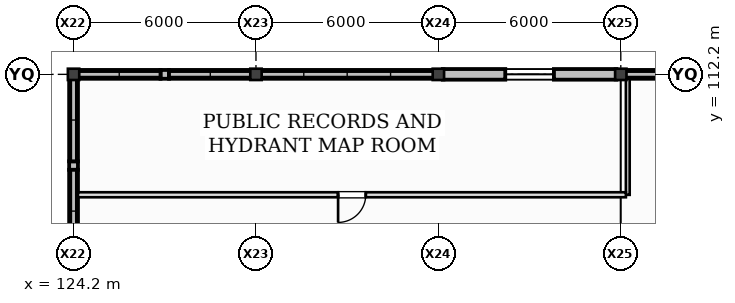
"""IFC4 building model, lengths in metres.
Left out: names, types, materials, properties, quantities, classifications, styles, units other than length and angle.
Written with IfcOpenShell. Run it as: python <this file> out.ifc"""

import sys

from ifc_helpers import new_model, si_unit, direction, frame, frame_2d, origin, origin_2d, place, context, subcontext, project, spatial, rectangle, i_section, extrude, element, fill, save


model = new_model("IFC4")
c1 = context("Model", 3, precision=1e-05, world=origin(), true_north=direction((0.0, 1.0)))
c2 = subcontext(c1, "Body", "Model", "MODEL_VIEW")
j1 = project(units=[si_unit("LENGTHUNIT", "METRE"), si_unit("PLANEANGLEUNIT", "RADIAN")], contexts=[c1])
p1 = place(None, origin())
s1 = spatial("IfcSite", under=j1, at=p1, CompositionType="ELEMENT")
p2 = place(p1, origin())
s2 = spatial("IfcBuilding", under=s1, at=p2, CompositionType="ELEMENT")
p3 = place(p2, origin())
s3 = spatial("IfcBuildingStorey", under=s2, at=p3, CompositionType="ELEMENT", Elevation=0.0)
for number, where, z_axis, x_axis in (
    (1, (124.2, 112.2, 0.0), (0.0, 0.0, 1.0), (1.0, 0.0, 0.0)),
    (2, (130.2, 112.2, 0.0), (0.0, 0.0, 1.0), (1.0, 0.0, 0.0)),
    (3, (136.2, 112.2, 0.0), (0.0, 0.0, 1.0), (1.0, 0.0, 0.0)),
    (4, (142.2, 112.2, 0.0), (0.0, 0.0, 1.0), (1.0, 0.0, 0.0)),
):
    element("IfcColumn", number, at=place(p3, frame(where, z_axis=z_axis, x_axis=x_axis)), inside=s3, PredefinedType="COLUMN", context=c2, shape_type="SweptSolid", body=[
        extrude(i_section(OverallWidth=0.374, OverallDepth=0.372, WebThickness=0.016, FlangeThickness=0.026, at=origin_2d()), origin(), (0.0, 0.0, 1.0), 6.0),
    ])
p4 = place(p3, frame((127.34, 112.2, 0.0), z_axis=(0.0, 0.0, 1.0), x_axis=(-1.0, 0.0, 0.0)))
e5 = element("IfcWall", 5, at=p4, inside=s3, PredefinedType="STANDARD", context=c2, shape_type="SweptSolid", body=[
    extrude(rectangle(XDim=0.28, YDim=0.29, at=frame_2d((0.14, 0.0))), origin(), (0.0, 0.0, 1.0), 5.113),
])
p5 = place(p3, frame((130.055, 112.2, 0.0), z_axis=(0.0, 0.0, 1.0), x_axis=(-1.0, 0.0, 0.0)))
e6 = element("IfcWall", 6, at=p5, inside=s3, PredefinedType="STANDARD", context=c2, shape_type="SweptSolid", body=[
    extrude(rectangle(XDim=2.715, YDim=0.29, at=frame_2d((1.357, 0.0))), origin(), (0.0, 0.0, 1.0), 0.92),
])
p6 = place(p3, frame((127.06, 112.2, 0.0), z_axis=(0.0, 0.0, 1.0), x_axis=(-1.0, 0.0, 0.0)))
e7 = element("IfcWall", 7, at=p6, inside=s3, PredefinedType="STANDARD", context=c2, shape_type="SweptSolid", body=[
    extrude(rectangle(XDim=2.715, YDim=0.29, at=frame_2d((1.357, 0.0))), origin(), (0.0, 0.0, 1.0), 0.32),
])
p7 = place(p3, frame((136.055, 112.2, 0.0), z_axis=(0.0, 0.0, 1.0), x_axis=(-1.0, 0.0, 0.0)))
e8 = element("IfcWall", 8, at=p7, inside=s3, PredefinedType="STANDARD", context=c2, shape_type="SweptSolid", body=[
    extrude(rectangle(XDim=5.71, YDim=0.29, at=frame_2d((2.855, 0.0))), origin(), (0.0, 0.0, 1.0), 0.44),
])
p8 = place(p3, frame((142.055, 112.2, 0.0), z_axis=(0.0, 0.0, 1.0), x_axis=(-1.0, 0.0, 0.0)))
e9 = element("IfcWall", 9, at=p8, inside=s3, PredefinedType="STANDARD", context=c2, shape_type="SweptSolid", body=[
    extrude(rectangle(XDim=5.71, YDim=0.35, at=frame_2d((2.855, 0.0))), origin(), (0.0, 0.0, 1.0), 5.113),
])
p9 = place(p8, frame((2.055, 0.0, 1.0)))
e10 = element("IfcOpeningElement", 10, at=p9, cuts=e9, PredefinedType="OPENING", context=c2, shape_type="SweptSolid", body=[
    extrude(rectangle(XDim=1.6, YDim=1.36, at=frame_2d((0.8, 0.68))), frame((0.0, 0.185, 0.0), z_axis=(0.0, -1.0, 0.0), x_axis=(1.0, 0.0, 0.0)), (0.0, 0.0, 1.0), 0.37),
])
p10 = place(p3, frame((148.055, 112.2, 0.0), z_axis=(0.0, 0.0, 1.0), x_axis=(-1.0, 0.0, 0.0)))
e11 = element("IfcWall", 11, at=p10, inside=s3, PredefinedType="STANDARD", context=c2, shape_type="SweptSolid", body=[
    extrude(rectangle(XDim=5.71, YDim=0.29, at=frame_2d((2.855, 0.0))), origin(), (0.0, 0.0, 1.0), 0.56),
])
p11 = place(p3, frame((124.2, 109.34, 0.0), z_axis=(0.0, 0.0, 1.0), x_axis=(0.0, -1.0, 0.0)))
e12 = element("IfcWall", 12, at=p11, inside=s3, PredefinedType="STANDARD", context=c2, shape_type="SweptSolid", body=[
    extrude(rectangle(XDim=0.28, YDim=0.29, at=frame_2d((0.14, 0.0))), origin(), (0.0, 0.0, 1.0), 5.044),
])
p12 = place(p3, frame((124.2, 112.055, 0.0), z_axis=(0.0, 0.0, 1.0), x_axis=(0.0, -1.0, 0.0)))
e13 = element("IfcWall", 13, at=p12, inside=s3, PredefinedType="STANDARD", context=c2, shape_type="SweptSolid", body=[
    extrude(rectangle(XDim=2.715, YDim=0.29, at=frame_2d((1.357, 0.0))), origin(), (0.0, 0.0, 1.0), 0.68),
])
p13 = place(p3, frame((124.2, 109.06, 0.0), z_axis=(0.0, 0.0, 1.0), x_axis=(0.0, -1.0, 0.0)))
e14 = element("IfcWall", 14, at=p13, inside=s3, PredefinedType="STANDARD", context=c2, shape_type="SweptSolid", body=[
    extrude(rectangle(XDim=2.715, YDim=0.29, at=frame_2d((1.357, 0.0))), origin(), (0.0, 0.0, 1.0), 0.8),
])
p14 = place(p3, frame((142.43, 112.055, 0.0), z_axis=(0.0, 0.0, 1.0), x_axis=(0.0, -1.0, 0.0)))
e15 = element("IfcWall", 15, at=p14, inside=s3, PredefinedType="PARTITIONING", context=c2, shape_type="SweptSolid", body=[
    extrude(rectangle(XDim=3.817, YDim=0.125, at=frame_2d((1.909, 0.0))), origin(), (0.0, 0.0, 1.0), 5.044),
])
p15 = place(p3, frame((142.367, 108.24, 0.0), z_axis=(0.0, 0.0, 1.0), x_axis=(-1.0, 0.0, 0.0)))
e16 = element("IfcWall", 16, at=p15, inside=s3, PredefinedType="PARTITIONING", context=c2, shape_type="SweptSolid", body=[
    extrude(rectangle(XDim=18.022, YDim=0.165, at=frame_2d((9.011, 0.0))), origin(), (0.0, 0.0, 1.0), 5.68),
])
p16 = place(p15, frame((8.556, 0.0, 0.0)))
e17 = element("IfcOpeningElement", 17, at=p16, cuts=e16, PredefinedType="OPENING", context=c2, shape_type="SweptSolid", body=[
    extrude(rectangle(XDim=0.91, YDim=2.1, at=frame_2d((0.455, 1.05))), frame((0.0, 0.093, 0.0), z_axis=(0.0, -1.0, 0.0), x_axis=(1.0, 0.0, 0.0)), (0.0, 0.0, 1.0), 0.185),
])
p17 = place(p9, origin())
e18 = element("IfcWindow", 18, at=p17, inside=s3, PartitioningType="SINGLE_PANEL", PredefinedType="WINDOW", context=c2, shape_type="SweptSolid", body=[
    extrude(rectangle(XDim=1.6, YDim=1.36, at=frame_2d((0.8, 0.68))), frame((0.0, 0.03, 0.0), z_axis=(0.0, -1.0, 0.0), x_axis=(1.0, 0.0, 0.0)), (0.0, 0.0, 1.0), 0.06),
])
fill(e10, e18)
p18 = place(p16, frame((0.91, 0.0, 0.0), z_axis=(0.0, 0.0, 1.0), x_axis=(-1.0, 0.0, 0.0)))
e19 = element("IfcDoor", 19, at=p18, inside=s3, OperationType="SINGLE_SWING_RIGHT", PredefinedType="DOOR", context=c2, shape_type="SweptSolid", body=[
    extrude(rectangle(XDim=0.91, YDim=2.1, at=frame_2d((0.455, 1.05))), frame((0.0, 0.025, 0.0), z_axis=(0.0, -1.0, 0.0), x_axis=(1.0, 0.0, 0.0)), (0.0, 0.0, 1.0), 0.05),
])
fill(e17, e19)
save(model, sys.argv[1])
